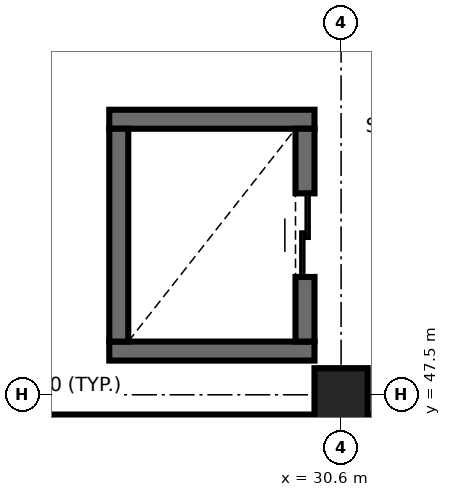
"""IFC4 building model, lengths in metres.
Left out: names, types, materials, properties, quantities, classifications, styles, units other than length and angle.
Written with IfcOpenShell. Run it as: python <this file> out.ifc"""

import sys

from ifc_helpers import new_model, si_unit, direction, frame, frame_2d, origin, origin_2d, place, context, subcontext, project, spatial, rectangle, extrude, element, fill, save


model = new_model("IFC4")
c1 = context("Model", 3, precision=1e-05, world=origin(), true_north=direction((0.0, 1.0)))
c2 = subcontext(c1, "Body", "Model", "MODEL_VIEW")
j1 = project(units=[si_unit("LENGTHUNIT", "METRE"), si_unit("PLANEANGLEUNIT", "RADIAN")], contexts=[c1])
p1 = place(None, origin())
s1 = spatial("IfcSite", under=j1, at=p1, CompositionType="ELEMENT")
p2 = place(p1, origin())
s2 = spatial("IfcBuilding", under=s1, at=p2, CompositionType="ELEMENT")
p3 = place(p2, frame((0.0, 0.0, 4.8)))
s3 = spatial("IfcBuildingStorey", under=s2, at=p3, CompositionType="ELEMENT", Elevation=4.8)
p4 = place(p3, frame((30.6, 47.5, 0.0), z_axis=(0.0, 0.0, 1.0), x_axis=(1.0, 0.0, 0.0)))
e1 = element("IfcColumn", 1, at=p4, inside=s3, PredefinedType="COLUMN", context=c2, shape_type="SweptSolid", body=[
    extrude(rectangle(XDim=0.7, YDim=0.7, at=origin_2d()), origin(), (0.0, 0.0, 1.0), 4.5),
])
for number, where, z_axis, x_axis in (
    (2, (27.55, 48.075, 0.0), (0.0, 0.0, 1.0), (1.0, 0.0, 0.0)),
    (3, (30.25, 51.125, 0.0), (0.0, 0.0, 1.0), (-1.0, 0.0, 0.0)),
):
    element("IfcWall", number, at=place(p3, frame(where, z_axis=z_axis, x_axis=x_axis)), inside=s3, PredefinedType="SHEAR", context=c2, shape_type="SweptSolid", body=[
        extrude(rectangle(XDim=2.7, YDim=0.25, at=frame_2d((1.35, 0.0))), origin(), (0.0, 0.0, 1.0), 4.5),
    ])
p5 = place(p3, frame((27.675, 51.0, 0.0), z_axis=(0.0, 0.0, 1.0), x_axis=(0.0, -1.0, 0.0)))
e4 = element("IfcWall", 4, at=p5, inside=s3, PredefinedType="SHEAR", context=c2, shape_type="SweptSolid", body=[
    extrude(rectangle(XDim=2.8, YDim=0.25, at=frame_2d((1.4, 0.0))), origin(), (0.0, 0.0, 1.0), 4.5),
])
p6 = place(p3, frame((30.125, 48.2, 0.0), z_axis=(0.0, 0.0, 1.0), x_axis=(0.0, 1.0, 0.0)))
e5 = element("IfcWall", 5, at=p6, inside=s3, PredefinedType="SHEAR", context=c2, shape_type="SweptSolid", body=[
    extrude(rectangle(XDim=2.8, YDim=0.25, at=frame_2d((1.4, 0.0))), origin(), (0.0, 0.0, 1.0), 4.5),
])
p7 = place(p6, frame((0.85, 0.0, 0.0)))
e6 = element("IfcOpeningElement", 6, at=p7, cuts=e5, PredefinedType="OPENING", context=c2, shape_type="SweptSolid", body=[
    extrude(rectangle(XDim=1.1, YDim=2.15, at=frame_2d((0.55, 1.075))), frame((0.0, 0.135, 0.0), z_axis=(0.0, -1.0, 0.0), x_axis=(1.0, 0.0, 0.0)), (0.0, 0.0, 1.0), 0.27),
])
p8 = place(p3, frame((5.922, 47.07, 0.0), z_axis=(0.0, 0.0, 1.0), x_axis=(1.0, 0.0, 0.0)))
e7 = element("IfcWall", 7, at=p8, inside=s3, PredefinedType="SOLIDWALL", context=c2, shape_type="SweptSolid", body=[
    extrude(rectangle(XDim=41.478, YDim=0.34, at=frame_2d((20.739, 0.0))), origin(), (0.0, 0.0, 1.0), 4.25),
])
p9 = place(p8, frame((33.878, 0.0, 0.0)))
e8 = element("IfcOpeningElement", 8, at=p9, cuts=e7, PredefinedType="OPENING", context=c2, shape_type="SweptSolid", body=[
    extrude(rectangle(XDim=1.6, YDim=2.2, at=frame_2d((0.8, 1.1))), frame((0.0, 0.18, 0.0), z_axis=(0.0, -1.0, 0.0), x_axis=(1.0, 0.0, 0.0)), (0.0, 0.0, 1.0), 0.36),
])
p10 = place(p8, frame((3.243, 0.0, 0.9)))
e9 = element("IfcOpeningElement", 9, at=p10, cuts=e7, PredefinedType="OPENING", context=c2, shape_type="SweptSolid", body=[
    extrude(rectangle(XDim=2.85, YDim=1.95, at=frame_2d((1.425, 0.975))), frame((0.0, 0.18, 0.0), z_axis=(0.0, -1.0, 0.0), x_axis=(1.0, 0.0, 0.0)), (0.0, 0.0, 1.0), 0.36),
])
p11 = place(p8, frame((25.408, 0.0, 0.9)))
e10 = element("IfcOpeningElement", 10, at=p11, cuts=e7, PredefinedType="OPENING", context=c2, shape_type="SweptSolid", body=[
    extrude(rectangle(XDim=2.2, YDim=1.65, at=frame_2d((1.1, 0.825))), frame((0.0, 0.18, 0.0), z_axis=(0.0, -1.0, 0.0), x_axis=(1.0, 0.0, 0.0)), (0.0, 0.0, 1.0), 0.36),
])
p12 = place(p8, frame((29.558, 0.0, 0.9)))
e11 = element("IfcOpeningElement", 11, at=p12, cuts=e7, PredefinedType="OPENING", context=c2, shape_type="SweptSolid", body=[
    extrude(rectangle(XDim=1.5, YDim=1.8, at=frame_2d((0.75, 0.9))), frame((0.0, 0.18, 0.0), z_axis=(0.0, -1.0, 0.0), x_axis=(1.0, 0.0, 0.0)), (0.0, 0.0, 1.0), 0.36),
])
p13 = place(p8, frame((37.628, 0.0, 0.9)))
e12 = element("IfcOpeningElement", 12, at=p13, cuts=e7, PredefinedType="OPENING", context=c2, shape_type="SweptSolid", body=[
    extrude(rectangle(XDim=2.1, YDim=1.8, at=frame_2d((1.05, 0.9))), frame((0.0, 0.18, 0.0), z_axis=(0.0, -1.0, 0.0), x_axis=(1.0, 0.0, 0.0)), (0.0, 0.0, 1.0), 0.36),
])
p14 = place(p7, origin())
e13 = element("IfcDoor", 13, at=p14, inside=s3, OperationType="DOUBLE_DOOR_SLIDING", PredefinedType="DOOR", context=c2, shape_type="SweptSolid", body=[
    extrude(rectangle(XDim=1.1, YDim=2.15, at=frame_2d((0.55, 1.075))), frame((0.0, 0.025, 0.0), z_axis=(0.0, -1.0, 0.0), x_axis=(1.0, 0.0, 0.0)), (0.0, 0.0, 1.0), 0.05),
])
fill(e6, e13)
save(model, sys.argv[1])
